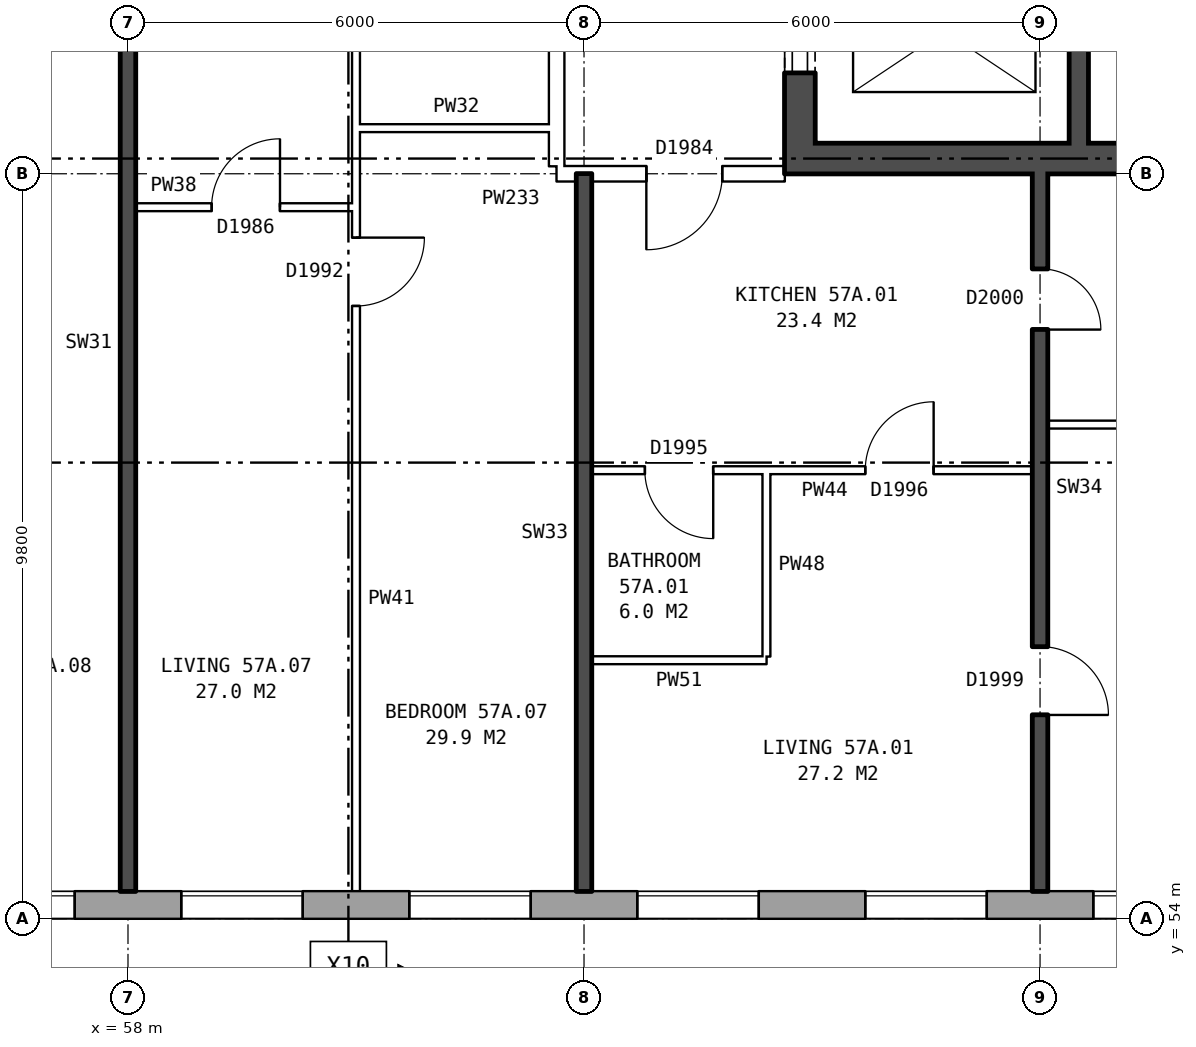
"""IFC4 building model, lengths in metres.
Left out: names, types, materials, properties, quantities, classifications, styles, units other than length and angle.
Written with IfcOpenShell. Run it as: python <this file> out.ifc"""

import sys

from ifc_helpers import new_model, si_unit, direction, frame, frame_2d, origin, place, context, subcontext, project, spatial, rectangle, extrude, element, fill, save


model = new_model("IFC4")
c1 = context("Model", 3, precision=1e-05, world=origin(), true_north=direction((0.0, 1.0)))
c2 = subcontext(c1, "Body", "Model", "MODEL_VIEW")
j1 = project(units=[si_unit("LENGTHUNIT", "METRE"), si_unit("PLANEANGLEUNIT", "RADIAN")], contexts=[c1])
p1 = place(None, origin())
s1 = spatial("IfcSite", under=j1, at=p1, CompositionType="ELEMENT")
p2 = place(p1, origin())
s2 = spatial("IfcBuilding", under=s1, at=p2, CompositionType="ELEMENT")
p3 = place(p2, frame((0.0, 0.0, 202.8)))
s3 = spatial("IfcBuildingStorey", under=s2, at=p3, CompositionType="ELEMENT", Elevation=202.8)
p4 = place(p3, frame((35.075, 54.18, 0.0), z_axis=(0.0, 0.0, 1.0), x_axis=(1.0, 0.0, 0.0)))
e1 = element("IfcWall", 1, at=p4, inside=s3, PredefinedType="STANDARD", context=c2, shape_type="SweptSolid", body=[
    extrude(rectangle(XDim=39.875, YDim=0.36, at=frame_2d((19.938, 0.0))), origin(), (0.0, 0.0, 1.0), 2.85),
])
p5 = place(p4, frame((2.625, 0.0, 0.8)))
e2 = element("IfcOpeningElement", 2, at=p5, cuts=e1, PredefinedType="OPENING", context=c2, shape_type="SweptSolid", body=[
    extrude(rectangle(XDim=1.6, YDim=1.8, at=frame_2d((0.8, 0.9))), frame((0.0, 0.19, 0.0), z_axis=(0.0, -1.0, 0.0), x_axis=(1.0, 0.0, 0.0)), (0.0, 0.0, 1.0), 0.38),
])
p6 = place(p4, frame((5.625, 0.0, 0.8)))
e3 = element("IfcOpeningElement", 3, at=p6, cuts=e1, PredefinedType="OPENING", context=c2, shape_type="SweptSolid", body=[
    extrude(rectangle(XDim=1.6, YDim=1.8, at=frame_2d((0.8, 0.9))), frame((0.0, 0.19, 0.0), z_axis=(0.0, -1.0, 0.0), x_axis=(1.0, 0.0, 0.0)), (0.0, 0.0, 1.0), 0.38),
])
p7 = place(p4, frame((8.625, 0.0, 0.8)))
e4 = element("IfcOpeningElement", 4, at=p7, cuts=e1, PredefinedType="OPENING", context=c2, shape_type="SweptSolid", body=[
    extrude(rectangle(XDim=1.6, YDim=1.8, at=frame_2d((0.8, 0.9))), frame((0.0, 0.19, 0.0), z_axis=(0.0, -1.0, 0.0), x_axis=(1.0, 0.0, 0.0)), (0.0, 0.0, 1.0), 0.38),
])
p8 = place(p4, frame((11.625, 0.0, 0.8)))
e5 = element("IfcOpeningElement", 5, at=p8, cuts=e1, PredefinedType="OPENING", context=c2, shape_type="SweptSolid", body=[
    extrude(rectangle(XDim=1.6, YDim=1.8, at=frame_2d((0.8, 0.9))), frame((0.0, 0.19, 0.0), z_axis=(0.0, -1.0, 0.0), x_axis=(1.0, 0.0, 0.0)), (0.0, 0.0, 1.0), 0.38),
])
p9 = place(p4, frame((14.625, 0.0, 0.8)))
e6 = element("IfcOpeningElement", 6, at=p9, cuts=e1, PredefinedType="OPENING", context=c2, shape_type="SweptSolid", body=[
    extrude(rectangle(XDim=1.6, YDim=1.8, at=frame_2d((0.8, 0.9))), frame((0.0, 0.19, 0.0), z_axis=(0.0, -1.0, 0.0), x_axis=(1.0, 0.0, 0.0)), (0.0, 0.0, 1.0), 0.38),
])
p10 = place(p4, frame((17.625, 0.0, 0.8)))
e7 = element("IfcOpeningElement", 7, at=p10, cuts=e1, PredefinedType="OPENING", context=c2, shape_type="SweptSolid", body=[
    extrude(rectangle(XDim=1.6, YDim=1.8, at=frame_2d((0.8, 0.9))), frame((0.0, 0.19, 0.0), z_axis=(0.0, -1.0, 0.0), x_axis=(1.0, 0.0, 0.0)), (0.0, 0.0, 1.0), 0.38),
])
p11 = place(p4, frame((20.625, 0.0, 0.8)))
e8 = element("IfcOpeningElement", 8, at=p11, cuts=e1, PredefinedType="OPENING", context=c2, shape_type="SweptSolid", body=[
    extrude(rectangle(XDim=1.6, YDim=1.8, at=frame_2d((0.8, 0.9))), frame((0.0, 0.19, 0.0), z_axis=(0.0, -1.0, 0.0), x_axis=(1.0, 0.0, 0.0)), (0.0, 0.0, 1.0), 0.38),
])
p12 = place(p4, frame((23.625, 0.0, 0.8)))
e9 = element("IfcOpeningElement", 9, at=p12, cuts=e1, PredefinedType="OPENING", context=c2, shape_type="SweptSolid", body=[
    extrude(rectangle(XDim=1.6, YDim=1.8, at=frame_2d((0.8, 0.9))), frame((0.0, 0.19, 0.0), z_axis=(0.0, -1.0, 0.0), x_axis=(1.0, 0.0, 0.0)), (0.0, 0.0, 1.0), 0.38),
])
p13 = place(p4, frame((26.625, 0.0, 0.8)))
e10 = element("IfcOpeningElement", 10, at=p13, cuts=e1, PredefinedType="OPENING", context=c2, shape_type="SweptSolid", body=[
    extrude(rectangle(XDim=1.6, YDim=1.8, at=frame_2d((0.8, 0.9))), frame((0.0, 0.19, 0.0), z_axis=(0.0, -1.0, 0.0), x_axis=(1.0, 0.0, 0.0)), (0.0, 0.0, 1.0), 0.38),
])
p14 = place(p4, frame((29.625, 0.0, 0.8)))
e11 = element("IfcOpeningElement", 11, at=p14, cuts=e1, PredefinedType="OPENING", context=c2, shape_type="SweptSolid", body=[
    extrude(rectangle(XDim=1.6, YDim=1.8, at=frame_2d((0.8, 0.9))), frame((0.0, 0.19, 0.0), z_axis=(0.0, -1.0, 0.0), x_axis=(1.0, 0.0, 0.0)), (0.0, 0.0, 1.0), 0.38),
])
p15 = place(p4, frame((32.625, 0.0, 0.8)))
e12 = element("IfcOpeningElement", 12, at=p15, cuts=e1, PredefinedType="OPENING", context=c2, shape_type="SweptSolid", body=[
    extrude(rectangle(XDim=1.6, YDim=1.8, at=frame_2d((0.8, 0.9))), frame((0.0, 0.19, 0.0), z_axis=(0.0, -1.0, 0.0), x_axis=(1.0, 0.0, 0.0)), (0.0, 0.0, 1.0), 0.38),
])
p16 = place(p4, frame((35.625, 0.0, 0.8)))
e13 = element("IfcOpeningElement", 13, at=p16, cuts=e1, PredefinedType="OPENING", context=c2, shape_type="SweptSolid", body=[
    extrude(rectangle(XDim=1.6, YDim=1.8, at=frame_2d((0.8, 0.9))), frame((0.0, 0.19, 0.0), z_axis=(0.0, -1.0, 0.0), x_axis=(1.0, 0.0, 0.0)), (0.0, 0.0, 1.0), 0.38),
])
p17 = place(p3, frame((66.84, 63.8, 0.0), z_axis=(0.0, 0.0, 1.0), x_axis=(0.0, 1.0, 0.0)))
e14 = element("IfcWall", 14, at=p17, inside=s3, PredefinedType="SHEAR", context=c2, shape_type="SweptSolid", body=[
    extrude(rectangle(XDim=12.4, YDim=0.4, at=frame_2d((6.2, 0.0))), origin(), (0.0, 0.0, 1.0), 2.85),
])
p18 = place(p17, frame((1.325, 0.0, 0.0)))
e15 = element("IfcOpeningElement", 15, at=p18, cuts=e14, PredefinedType="OPENING", context=c2, shape_type="SweptSolid", body=[
    extrude(rectangle(XDim=1.1, YDim=2.1, at=frame_2d((0.55, 1.05))), frame((0.0, 0.21, 0.0), z_axis=(0.0, -1.0, 0.0), x_axis=(1.0, 0.0, 0.0)), (0.0, 0.0, 1.0), 0.42),
])
p19 = place(p17, frame((3.6, 0.0, 0.0)))
e16 = element("IfcOpeningElement", 16, at=p19, cuts=e14, PredefinedType="OPENING", context=c2, shape_type="SweptSolid", body=[
    extrude(rectangle(XDim=1.1, YDim=2.1, at=frame_2d((0.55, 1.05))), frame((0.0, 0.21, 0.0), z_axis=(0.0, -1.0, 0.0), x_axis=(1.0, 0.0, 0.0)), (0.0, 0.0, 1.0), 0.42),
])
p20 = place(p17, frame((5.8, 0.0, 0.0)))
e17 = element("IfcOpeningElement", 17, at=p20, cuts=e14, PredefinedType="OPENING", context=c2, shape_type="SweptSolid", body=[
    extrude(rectangle(XDim=1.1, YDim=2.1, at=frame_2d((0.55, 1.05))), frame((0.0, 0.21, 0.0), z_axis=(0.0, -1.0, 0.0), x_axis=(1.0, 0.0, 0.0)), (0.0, 0.0, 1.0), 0.42),
])
p21 = place(p17, frame((8.0, 0.0, 0.0)))
e18 = element("IfcOpeningElement", 18, at=p21, cuts=e14, PredefinedType="OPENING", context=c2, shape_type="SweptSolid", body=[
    extrude(rectangle(XDim=1.1, YDim=2.1, at=frame_2d((0.55, 1.05))), frame((0.0, 0.21, 0.0), z_axis=(0.0, -1.0, 0.0), x_axis=(1.0, 0.0, 0.0)), (0.0, 0.0, 1.0), 0.42),
])
p22 = place(p17, frame((9.9, 0.0, 0.0)))
e19 = element("IfcOpeningElement", 19, at=p22, cuts=e14, PredefinedType="OPENING", context=c2, shape_type="SweptSolid", body=[
    extrude(rectangle(XDim=1.1, YDim=2.1, at=frame_2d((0.55, 1.05))), frame((0.0, 0.21, 0.0), z_axis=(0.0, -1.0, 0.0), x_axis=(1.0, 0.0, 0.0)), (0.0, 0.0, 1.0), 0.42),
])
p23 = place(p3, frame((67.04, 64.0, 0.0), z_axis=(0.0, 0.0, 1.0), x_axis=(1.0, 0.0, 0.0)))
e20 = element("IfcWall", 20, at=p23, inside=s3, PredefinedType="SHEAR", context=c2, shape_type="SweptSolid", body=[
    extrude(rectangle(XDim=8.2, YDim=0.4, at=frame_2d((4.1, 0.0))), origin(), (0.0, 0.0, 1.0), 2.85),
])
p24 = place(p3, frame((70.51, 64.2, 0.0), z_axis=(0.0, 0.0, 1.0), x_axis=(0.0, 1.0, 0.0)))
e21 = element("IfcWall", 21, at=p24, inside=s3, PredefinedType="SHEAR", context=c2, shape_type="SweptSolid", body=[
    extrude(rectangle(XDim=2.525, YDim=0.25, at=frame_2d((1.263, 0.0))), origin(), (0.0, 0.0, 1.0), 2.85),
])
p25 = place(p3, frame((63.64, 63.9, 0.0), z_axis=(0.0, 0.0, 1.0), x_axis=(0.0, 1.0, 0.0)))
e22 = element("IfcWall", 22, at=p25, inside=s3, PredefinedType="PARTITIONING", context=c2, shape_type="SweptSolid", body=[
    extrude(rectangle(XDim=12.2, YDim=0.2, at=frame_2d((6.1, 0.0))), origin(), (0.0, 0.0, 1.0), 2.85),
])
p26 = place(p25, frame((5.1, 0.0, 0.0)))
e23 = element("IfcOpeningElement", 23, at=p26, cuts=e22, PredefinedType="OPENING", context=c2, shape_type="SweptSolid", body=[
    extrude(rectangle(XDim=2.0, YDim=2.1, at=frame_2d((1.0, 1.05))), frame((0.0, 0.11, 0.0), z_axis=(0.0, -1.0, 0.0), x_axis=(1.0, 0.0, 0.0)), (0.0, 0.0, 1.0), 0.22),
])
p27 = place(p3, frame((64.1, 57.4, 0.0), z_axis=(0.0, 0.0, 1.0), x_axis=(1.0, 0.0, 0.0)))
e24 = element("IfcWall", 24, at=p27, inside=s3, PredefinedType="PARTITIONING", context=c2, shape_type="SweptSolid", body=[
    extrude(rectangle(XDim=2.3, YDim=0.1, at=frame_2d((1.15, 0.0))), origin(), (0.0, 0.0, 1.0), 2.85),
])
p28 = place(p3, frame((64.1, 59.9, 0.0), z_axis=(0.0, 0.0, 1.0), x_axis=(1.0, 0.0, 0.0)))
e25 = element("IfcWall", 25, at=p28, inside=s3, PredefinedType="PARTITIONING", context=c2, shape_type="SweptSolid", body=[
    extrude(rectangle(XDim=5.8, YDim=0.1, at=frame_2d((2.9, 0.0))), origin(), (0.0, 0.0, 1.0), 2.85),
])
p29 = place(p28, frame((3.6, 0.0, 0.0)))
e26 = element("IfcOpeningElement", 26, at=p29, cuts=e25, PredefinedType="OPENING", context=c2, shape_type="SweptSolid", body=[
    extrude(rectangle(XDim=0.9, YDim=2.1, at=frame_2d((0.45, 1.05))), frame((0.0, 0.06, 0.0), z_axis=(0.0, -1.0, 0.0), x_axis=(1.0, 0.0, 0.0)), (0.0, 0.0, 1.0), 0.12),
])
p30 = place(p28, frame((0.7, 0.0, 0.0)))
e27 = element("IfcOpeningElement", 27, at=p30, cuts=e25, PredefinedType="OPENING", context=c2, shape_type="SweptSolid", body=[
    extrude(rectangle(XDim=0.9, YDim=2.1, at=frame_2d((0.45, 1.05))), frame((0.0, 0.06, 0.0), z_axis=(0.0, -1.0, 0.0), x_axis=(1.0, 0.0, 0.0)), (0.0, 0.0, 1.0), 0.12),
])
p31 = place(p3, frame((70.1, 60.5, 0.0), z_axis=(0.0, 0.0, 1.0), x_axis=(1.0, 0.0, 0.0)))
e28 = element("IfcWall", 28, at=p31, inside=s3, PredefinedType="PARTITIONING", context=c2, shape_type="SweptSolid", body=[
    extrude(rectangle(XDim=5.8, YDim=0.1, at=frame_2d((2.9, 0.0))), origin(), (0.0, 0.0, 1.0), 2.85),
])
p32 = place(p3, frame((58.1, 63.36, 0.0), z_axis=(0.0, 0.0, 1.0), x_axis=(1.0, 0.0, 0.0)))
e29 = element("IfcWall", 29, at=p32, inside=s3, PredefinedType="PARTITIONING", context=c2, shape_type="SweptSolid", body=[
    extrude(rectangle(XDim=2.9, YDim=0.1, at=frame_2d((1.45, 0.0))), origin(), (0.0, 0.0, 1.0), 2.85),
])
p33 = place(p32, frame((1.0, 0.0, 0.0)))
e30 = element("IfcOpeningElement", 30, at=p33, cuts=e29, PredefinedType="OPENING", context=c2, shape_type="SweptSolid", body=[
    extrude(rectangle(XDim=0.9, YDim=2.1, at=frame_2d((0.45, 1.05))), frame((0.0, 0.06, 0.0), z_axis=(0.0, -1.0, 0.0), x_axis=(1.0, 0.0, 0.0)), (0.0, 0.0, 1.0), 0.12),
])
p34 = place(p3, frame((63.64, 63.8, 0.0), z_axis=(0.0, 0.0, 1.0), x_axis=(1.0, 0.0, 0.0)))
e31 = element("IfcWall", 31, at=p34, inside=s3, PredefinedType="PARTITIONING", context=c2, shape_type="SweptSolid", body=[
    extrude(rectangle(XDim=3.0, YDim=0.2, at=frame_2d((1.5, 0.0))), origin(), (0.0, 0.0, 1.0), 2.85),
])
p35 = place(p34, frame((1.18, 0.0, 0.0)))
e32 = element("IfcOpeningElement", 32, at=p35, cuts=e31, PredefinedType="OPENING", context=c2, shape_type="SweptSolid", body=[
    extrude(rectangle(XDim=1.0, YDim=2.1, at=frame_2d((0.5, 1.05))), frame((0.0, 0.11, 0.0), z_axis=(0.0, -1.0, 0.0), x_axis=(1.0, 0.0, 0.0)), (0.0, 0.0, 1.0), 0.22),
])
p36 = place(p3, frame((61.0, 64.4, 0.0), z_axis=(0.0, 0.0, 1.0), x_axis=(1.0, 0.0, 0.0)))
e33 = element("IfcWall", 33, at=p36, inside=s3, PredefinedType="PARTITIONING", context=c2, shape_type="SweptSolid", body=[
    extrude(rectangle(XDim=2.64, YDim=0.1, at=frame_2d((1.32, 0.0))), origin(), (0.0, 0.0, 1.0), 2.85),
])
p37 = place(p3, frame((58.0, 54.36, 0.0), z_axis=(0.0, 0.0, 1.0), x_axis=(0.0, 1.0, 0.0)))
e34 = element("IfcWall", 34, at=p37, inside=s3, PredefinedType="SOLIDWALL", context=c2, shape_type="SweptSolid", body=[
    extrude(rectangle(XDim=14.44, YDim=0.2, at=frame_2d((7.22, 0.0))), origin(), (0.0, 0.0, 1.0), 2.85),
])
p38 = place(p3, frame((61.0, 54.36, 0.0), z_axis=(0.0, 0.0, 1.0), x_axis=(0.0, 1.0, 0.0)))
e35 = element("IfcWall", 35, at=p38, inside=s3, PredefinedType="PARTITIONING", context=c2, shape_type="SweptSolid", body=[
    extrude(rectangle(XDim=14.34, YDim=0.1, at=frame_2d((7.17, 0.0))), origin(), (0.0, 0.0, 1.0), 2.85),
])
p39 = place(p38, frame((7.7, 0.0, 0.0)))
e36 = element("IfcOpeningElement", 36, at=p39, cuts=e35, PredefinedType="OPENING", context=c2, shape_type="SweptSolid", body=[
    extrude(rectangle(XDim=0.9, YDim=2.1, at=frame_2d((0.45, 1.05))), frame((0.0, 0.06, 0.0), z_axis=(0.0, -1.0, 0.0), x_axis=(1.0, 0.0, 0.0)), (0.0, 0.0, 1.0), 0.12),
])
p40 = place(p38, frame((13.04, 0.0, 0.0)))
e37 = element("IfcOpeningElement", 37, at=p40, cuts=e35, PredefinedType="OPENING", context=c2, shape_type="SweptSolid", body=[
    extrude(rectangle(XDim=0.9, YDim=2.1, at=frame_2d((0.45, 1.05))), frame((0.0, 0.06, 0.0), z_axis=(0.0, -1.0, 0.0), x_axis=(1.0, 0.0, 0.0)), (0.0, 0.0, 1.0), 0.12),
])
p41 = place(p3, frame((64.0, 54.36, 0.0), z_axis=(0.0, 0.0, 1.0), x_axis=(0.0, 1.0, 0.0)))
e38 = element("IfcWall", 38, at=p41, inside=s3, PredefinedType="SOLIDWALL", context=c2, shape_type="SweptSolid", body=[
    extrude(rectangle(XDim=9.44, YDim=0.2, at=frame_2d((4.72, 0.0))), origin(), (0.0, 0.0, 1.0), 2.85),
])
p42 = place(p3, frame((66.4, 57.45, 0.0), z_axis=(0.0, 0.0, 1.0), x_axis=(0.0, 1.0, 0.0)))
e39 = element("IfcWall", 39, at=p42, inside=s3, PredefinedType="PARTITIONING", context=c2, shape_type="SweptSolid", body=[
    extrude(rectangle(XDim=2.4, YDim=0.1, at=frame_2d((1.2, 0.0))), origin(), (0.0, 0.0, 1.0), 2.85),
])
p43 = place(p3, frame((70.0, 54.36, 0.0), z_axis=(0.0, 0.0, 1.0), x_axis=(0.0, 1.0, 0.0)))
e40 = element("IfcWall", 40, at=p43, inside=s3, PredefinedType="SOLIDWALL", context=c2, shape_type="SweptSolid", body=[
    extrude(rectangle(XDim=9.44, YDim=0.2, at=frame_2d((4.72, 0.0))), origin(), (0.0, 0.0, 1.0), 2.85),
])
p44 = place(p43, frame((2.32, 0.0, 0.0)))
e41 = element("IfcOpeningElement", 41, at=p44, cuts=e40, PredefinedType="OPENING", context=c2, shape_type="SweptSolid", body=[
    extrude(rectangle(XDim=0.9, YDim=2.1, at=frame_2d((0.45, 1.05))), frame((0.0, 0.11, 0.0), z_axis=(0.0, -1.0, 0.0), x_axis=(1.0, 0.0, 0.0)), (0.0, 0.0, 1.0), 0.22),
])
p45 = place(p43, frame((7.39, 0.0, 0.0)))
e42 = element("IfcOpeningElement", 42, at=p45, cuts=e40, PredefinedType="OPENING", context=c2, shape_type="SweptSolid", body=[
    extrude(rectangle(XDim=0.8, YDim=2.1, at=frame_2d((0.4, 1.05))), frame((0.0, 0.11, 0.0), z_axis=(0.0, -1.0, 0.0), x_axis=(1.0, 0.0, 0.0)), (0.0, 0.0, 1.0), 0.22),
])
p46 = place(p11, origin())
e43 = element("IfcWindow", 43, at=p46, inside=s3, PartitioningType="SINGLE_PANEL", PredefinedType="WINDOW", context=c2, shape_type="SweptSolid", body=[
    extrude(rectangle(XDim=1.6, YDim=1.8, at=frame_2d((0.8, 0.9))), frame((0.0, 0.15, 0.0), z_axis=(0.0, -1.0, 0.0), x_axis=(1.0, 0.0, 0.0)), (0.0, 0.0, 1.0), 0.06),
])
fill(e8, e43)
p47 = place(p12, origin())
e44 = element("IfcWindow", 44, at=p47, inside=s3, PartitioningType="SINGLE_PANEL", PredefinedType="WINDOW", context=c2, shape_type="SweptSolid", body=[
    extrude(rectangle(XDim=1.6, YDim=1.8, at=frame_2d((0.8, 0.9))), frame((0.0, 0.15, 0.0), z_axis=(0.0, -1.0, 0.0), x_axis=(1.0, 0.0, 0.0)), (0.0, 0.0, 1.0), 0.06),
])
fill(e9, e44)
p48 = place(p13, origin())
e45 = element("IfcWindow", 45, at=p48, inside=s3, PartitioningType="SINGLE_PANEL", PredefinedType="WINDOW", context=c2, shape_type="SweptSolid", body=[
    extrude(rectangle(XDim=1.6, YDim=1.8, at=frame_2d((0.8, 0.9))), frame((0.0, 0.15, 0.0), z_axis=(0.0, -1.0, 0.0), x_axis=(1.0, 0.0, 0.0)), (0.0, 0.0, 1.0), 0.06),
])
fill(e10, e45)
p49 = place(p14, origin())
e46 = element("IfcWindow", 46, at=p49, inside=s3, PartitioningType="SINGLE_PANEL", PredefinedType="WINDOW", context=c2, shape_type="SweptSolid", body=[
    extrude(rectangle(XDim=1.6, YDim=1.8, at=frame_2d((0.8, 0.9))), frame((0.0, 0.15, 0.0), z_axis=(0.0, -1.0, 0.0), x_axis=(1.0, 0.0, 0.0)), (0.0, 0.0, 1.0), 0.06),
])
fill(e11, e46)
p50 = place(p15, origin())
e47 = element("IfcWindow", 47, at=p50, inside=s3, PartitioningType="SINGLE_PANEL", PredefinedType="WINDOW", context=c2, shape_type="SweptSolid", body=[
    extrude(rectangle(XDim=1.6, YDim=1.8, at=frame_2d((0.8, 0.9))), frame((0.0, 0.15, 0.0), z_axis=(0.0, -1.0, 0.0), x_axis=(1.0, 0.0, 0.0)), (0.0, 0.0, 1.0), 0.06),
])
fill(e12, e47)
p51 = place(p16, origin())
e48 = element("IfcWindow", 48, at=p51, inside=s3, PartitioningType="SINGLE_PANEL", PredefinedType="WINDOW", context=c2, shape_type="SweptSolid", body=[
    extrude(rectangle(XDim=1.6, YDim=1.8, at=frame_2d((0.8, 0.9))), frame((0.0, 0.15, 0.0), z_axis=(0.0, -1.0, 0.0), x_axis=(1.0, 0.0, 0.0)), (0.0, 0.0, 1.0), 0.06),
])
fill(e13, e48)
p52 = place(p18, origin())
e49 = element("IfcDoor", 49, at=p52, inside=s3, OperationType="DOUBLE_DOOR_SLIDING", PredefinedType="DOOR", context=c2, shape_type="SweptSolid", body=[
    extrude(rectangle(XDim=1.1, YDim=2.1, at=frame_2d((0.55, 1.05))), frame((0.0, -0.135, 0.0), z_axis=(0.0, -1.0, 0.0), x_axis=(1.0, 0.0, 0.0)), (0.0, 0.0, 1.0), 0.05),
])
fill(e15, e49)
p53 = place(p44, frame((0.9, 0.0, 0.0), z_axis=(0.0, 0.0, 1.0), x_axis=(-1.0, 0.0, 0.0)))
e50 = element("IfcDoor", 50, at=p53, inside=s3, OperationType="SINGLE_SWING_RIGHT", PredefinedType="DOOR", context=c2, shape_type="SweptSolid", body=[
    extrude(rectangle(XDim=0.9, YDim=2.1, at=frame_2d((0.45, 1.05))), frame((0.0, 0.025, 0.0), z_axis=(0.0, -1.0, 0.0), x_axis=(1.0, 0.0, 0.0)), (0.0, 0.0, 1.0), 0.05),
])
fill(e41, e50)
p54 = place(p35, frame((1.0, 0.0, 0.0), z_axis=(0.0, 0.0, 1.0), x_axis=(-1.0, 0.0, 0.0)))
e51 = element("IfcDoor", 51, at=p54, inside=s3, OperationType="SINGLE_SWING_RIGHT", PredefinedType="DOOR", context=c2, shape_type="SweptSolid", body=[
    extrude(rectangle(XDim=1.0, YDim=2.1, at=frame_2d((0.5, 1.05))), frame((0.0, 0.025, 0.0), z_axis=(0.0, -1.0, 0.0), x_axis=(1.0, 0.0, 0.0)), (0.0, 0.0, 1.0), 0.05),
])
fill(e32, e51)
p55 = place(p29, origin())
e52 = element("IfcDoor", 52, at=p55, inside=s3, OperationType="SINGLE_SWING_RIGHT", PredefinedType="DOOR", context=c2, shape_type="SweptSolid", body=[
    extrude(rectangle(XDim=0.9, YDim=2.1, at=frame_2d((0.45, 1.05))), frame((0.0, 0.025, 0.0), z_axis=(0.0, -1.0, 0.0), x_axis=(1.0, 0.0, 0.0)), (0.0, 0.0, 1.0), 0.05),
])
fill(e26, e52)
p56 = place(p45, frame((0.8, 0.0, 0.0), z_axis=(0.0, 0.0, 1.0), x_axis=(-1.0, 0.0, 0.0)))
e53 = element("IfcDoor", 53, at=p56, inside=s3, OperationType="SINGLE_SWING_RIGHT", PredefinedType="DOOR", context=c2, shape_type="SweptSolid", body=[
    extrude(rectangle(XDim=0.8, YDim=2.1, at=frame_2d((0.4, 1.05))), frame((0.0, 0.025, 0.0), z_axis=(0.0, -1.0, 0.0), x_axis=(1.0, 0.0, 0.0)), (0.0, 0.0, 1.0), 0.05),
])
fill(e42, e53)
p57 = place(p30, frame((0.9, 0.0, 0.0), z_axis=(0.0, 0.0, 1.0), x_axis=(-1.0, 0.0, 0.0)))
e54 = element("IfcDoor", 54, at=p57, inside=s3, OperationType="SINGLE_SWING_LEFT", PredefinedType="DOOR", context=c2, shape_type="SweptSolid", body=[
    extrude(rectangle(XDim=0.9, YDim=2.1, at=frame_2d((0.45, 1.05))), frame((0.0, 0.025, 0.0), z_axis=(0.0, -1.0, 0.0), x_axis=(1.0, 0.0, 0.0)), (0.0, 0.0, 1.0), 0.05),
])
fill(e27, e54)
p58 = place(p39, frame((0.9, 0.0, 0.0), z_axis=(0.0, 0.0, 1.0), x_axis=(-1.0, 0.0, 0.0)))
e55 = element("IfcDoor", 55, at=p58, inside=s3, OperationType="SINGLE_SWING_LEFT", PredefinedType="DOOR", context=c2, shape_type="SweptSolid", body=[
    extrude(rectangle(XDim=0.9, YDim=2.1, at=frame_2d((0.45, 1.05))), frame((0.0, 0.025, 0.0), z_axis=(0.0, -1.0, 0.0), x_axis=(1.0, 0.0, 0.0)), (0.0, 0.0, 1.0), 0.05),
])
fill(e36, e55)
p59 = place(p33, origin())
e56 = element("IfcDoor", 56, at=p59, inside=s3, OperationType="SINGLE_SWING_RIGHT", PredefinedType="DOOR", context=c2, shape_type="SweptSolid", body=[
    extrude(rectangle(XDim=0.9, YDim=2.1, at=frame_2d((0.45, 1.05))), frame((0.0, 0.025, 0.0), z_axis=(0.0, -1.0, 0.0), x_axis=(1.0, 0.0, 0.0)), (0.0, 0.0, 1.0), 0.05),
])
fill(e30, e56)
save(model, sys.argv[1])
